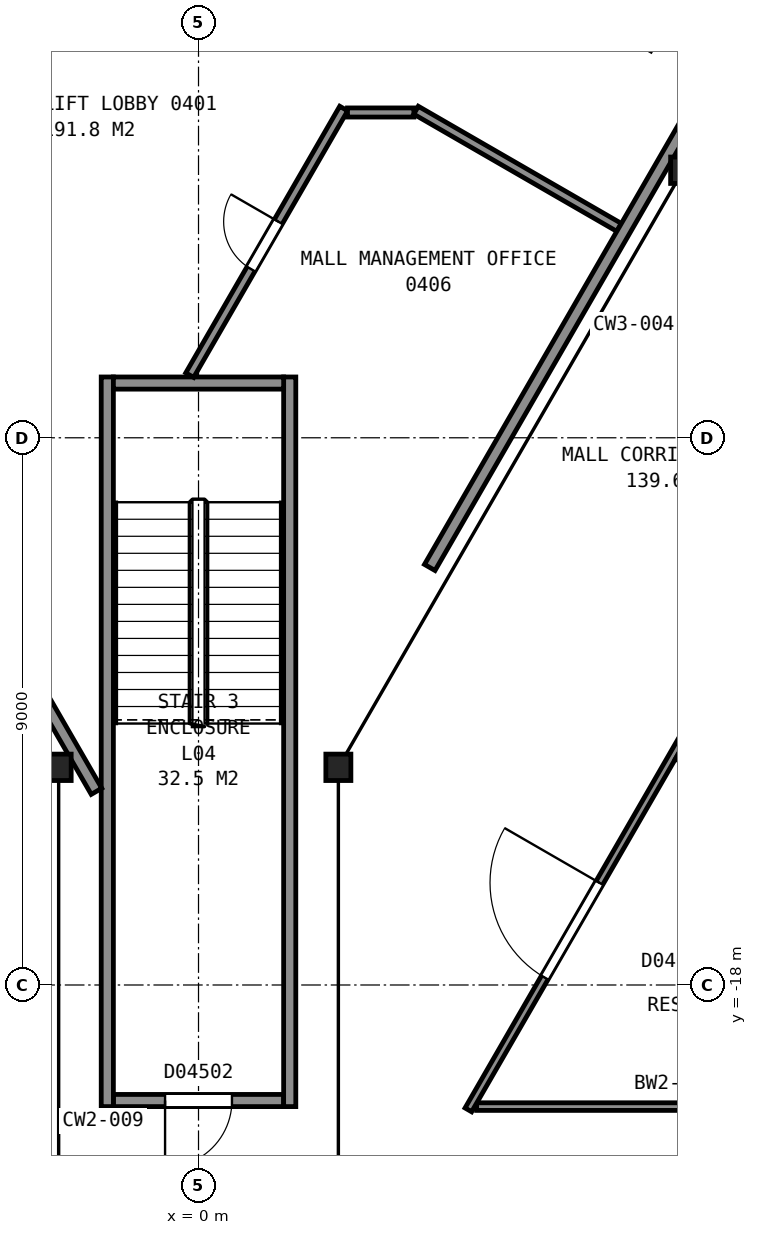
"""IFC4 building model, lengths in metres.
Left out: names, types, materials, properties, quantities, classifications, styles, units other than length and angle.
Written with IfcOpenShell. Run it as: python <this file> out.ifc"""

import sys

from ifc_helpers import new_model, si_unit, direction, frame, frame_2d, origin, origin_2d, place, context, subcontext, project, spatial, rectangle, i_section, extrude, element, fill, save


model = new_model("IFC4")
c1 = context("Model", 3, precision=1e-05, world=origin(), true_north=direction((0.0, 1.0)))
c2 = subcontext(c1, "Body", "Model", "MODEL_VIEW")
j1 = project(units=[si_unit("LENGTHUNIT", "METRE"), si_unit("PLANEANGLEUNIT", "RADIAN")], contexts=[c1])
p1 = place(None, origin())
s1 = spatial("IfcSite", under=j1, at=p1, CompositionType="ELEMENT")
p2 = place(p1, origin())
s2 = spatial("IfcBuilding", under=s1, at=p2, CompositionType="ELEMENT")
p3 = place(p2, frame((0.0, 0.0, 27.2)))
s3 = spatial("IfcBuildingStorey", under=s2, at=p3, CompositionType="ELEMENT", Elevation=27.2)
for number, where, z_axis, x_axis in (
    (1, (-2.3, -14.42, 0.0), (0.0, 0.0, 1.0), (1.0, 0.0, 0.0)),
    (2, (2.3, -14.42, 0.0), (0.0, 0.0, 1.0), (1.0, 0.0, 0.0)),
    (3, (7.97, -4.6, 0.0), (0.0, 0.0, 1.0), (1.0, 0.0, 0.0)),
):
    element("IfcColumn", number, at=place(p3, frame(where, z_axis=z_axis, x_axis=x_axis)), inside=s3, PredefinedType="COLUMN", context=c2, shape_type="SweptSolid", body=[
        extrude(i_section(OverallWidth=0.411, OverallDepth=0.434, WebThickness=0.036, FlangeThickness=0.057, FilletRadius=0.015, at=origin_2d()), origin(), (0.0, 0.0, 1.0), 4.8),
    ])
p4 = place(p3, frame((-1.4, -19.9, 0.0), z_axis=(0.0, 0.0, 1.0), x_axis=(1.0, 0.0, 0.0)))
e4 = element("IfcWall", 4, at=p4, inside=s3, PredefinedType="PARTITIONING", context=c2, shape_type="SweptSolid", body=[
    extrude(rectangle(XDim=2.8, YDim=0.2, at=frame_2d((1.4, 0.0))), origin(), (0.0, 0.0, 1.0), 4.55),
])
p5 = place(p4, frame((0.85, 0.0, 0.0)))
e5 = element("IfcOpeningElement", 5, at=p5, cuts=e4, PredefinedType="OPENING", context=c2, shape_type="SweptSolid", body=[
    extrude(rectangle(XDim=1.1, YDim=2.1, at=frame_2d((0.55, 1.05))), frame((0.0, 0.11, 0.0), z_axis=(0.0, -1.0, 0.0), x_axis=(1.0, 0.0, 0.0)), (0.0, 0.0, 1.0), 0.22),
])
for number, where, z_axis, x_axis in (
    (6, (1.5, -8.0, 0.0), (0.0, 0.0, 1.0), (0.0, -1.0, 0.0)),
    (7, (-1.5, -8.0, 0.0), (0.0, 0.0, 1.0), (0.0, -1.0, 0.0)),
):
    element("IfcWall", number, at=place(p3, frame(where, z_axis=z_axis, x_axis=x_axis)), inside=s3, PredefinedType="PARTITIONING", context=c2, shape_type="SweptSolid", body=[
        extrude(rectangle(XDim=12.0, YDim=0.2, at=frame_2d((6.0, 0.0))), origin(), (0.0, 0.0, 1.0), 4.55),
    ])
p6 = place(p3, frame((-1.4, -8.1, 0.0), z_axis=(0.0, 0.0, 1.0), x_axis=(1.0, 0.0, 0.0)))
e8 = element("IfcWall", 8, at=p6, inside=s3, PredefinedType="PARTITIONING", context=c2, shape_type="SweptSolid", body=[
    extrude(rectangle(XDim=2.8, YDim=0.2, at=frame_2d((1.4, 0.0))), origin(), (0.0, 0.0, 1.0), 4.55),
])
p7 = place(p3, frame((-4.914, -9.208, 0.0), z_axis=(0.0, 0.0, 1.0), x_axis=(0.499947703927, -0.866055594831, 0.0)))
e9 = element("IfcWall", 9, at=p7, inside=s3, PredefinedType="PARTITIONING", context=c2, shape_type="SweptSolid", body=[
    extrude(rectangle(XDim=6.474, YDim=0.2, at=frame_2d((3.237, 0.0))), origin(), (0.0, 0.0, 1.0), 4.55),
])
p8 = place(p3, frame((2.387, -3.585, 0.0), z_axis=(0.0, 0.0, 1.0), x_axis=(-0.500064700545, -0.865988045685, 0.0)))
e10 = element("IfcWall", 10, at=p8, inside=s3, PredefinedType="PARTITIONING", context=c2, shape_type="SweptSolid", body=[
    extrude(rectangle(XDim=5.063, YDim=0.15, at=frame_2d((2.532, 0.0))), origin(), (0.0, 0.0, 1.0), 4.55),
])
p9 = place(p8, frame((2.148, 0.0, 0.0)))
e11 = element("IfcOpeningElement", 11, at=p9, cuts=e10, PredefinedType="OPENING", context=c2, shape_type="SweptSolid", body=[
    extrude(rectangle(XDim=0.9, YDim=2.1, at=frame_2d((0.45, 1.05))), frame((0.0, 0.085, 0.0), z_axis=(0.0, -1.0, 0.0), x_axis=(1.0, 0.0, 0.0)), (0.0, 0.0, 1.0), 0.17),
])
p10 = place(p3, frame((2.45, -3.65, 0.0), z_axis=(0.0, 0.0, 1.0), x_axis=(1.0, 0.0, 0.0)))
e12 = element("IfcWall", 12, at=p10, inside=s3, PredefinedType="PARTITIONING", context=c2, shape_type="SweptSolid", body=[
    extrude(rectangle(XDim=1.092, YDim=0.15, at=frame_2d((0.546, 0.0))), origin(), (0.0, 0.0, 1.0), 4.55),
])
p11 = place(p3, frame((3.577, -3.613, 0.0), z_axis=(0.0, 0.0, 1.0), x_axis=(0.866080151888, -0.499905161512, 0.0)))
e13 = element("IfcWall", 13, at=p11, inside=s3, PredefinedType="PARTITIONING", context=c2, shape_type="SweptSolid", body=[
    extrude(rectangle(XDim=3.856, YDim=0.15, at=frame_2d((1.928, 0.0))), origin(), (0.0, 0.0, 1.0), 4.55),
])
p12 = place(p3, frame((3.803, -11.133, 0.0), z_axis=(0.0, 0.0, 1.0), x_axis=(0.499995287022, 0.866028124807, 0.0)))
e14 = element("IfcWall", 14, at=p12, inside=s3, PredefinedType="PARTITIONING", context=c2, shape_type="SweptSolid", body=[
    extrude(rectangle(XDim=19.726, YDim=0.2, at=frame_2d((9.863, 0.0))), origin(), (0.0, 0.0, 1.0), 4.55),
])
p13 = place(p12, frame((9.2, 0.0, 0.0)))
e15 = element("IfcOpeningElement", 15, at=p13, cuts=e14, PredefinedType="OPENING", context=c2, shape_type="SweptSolid", body=[
    extrude(rectangle(XDim=1.8, YDim=2.1, at=frame_2d((0.9, 1.05))), frame((0.0, 0.11, 0.0), z_axis=(0.0, -1.0, 0.0), x_axis=(1.0, 0.0, 0.0)), (0.0, 0.0, 1.0), 0.22),
])
p14 = place(p3, frame((4.574, -20.0, 0.0), z_axis=(0.0, 0.0, 1.0), x_axis=(1.0, 0.0, 0.0)))
e16 = element("IfcWall", 16, at=p14, inside=s3, PredefinedType="PARTITIONING", context=c2, shape_type="SweptSolid", body=[
    extrude(rectangle(XDim=7.285, YDim=0.125, at=frame_2d((3.643, 0.0))), origin(), (0.0, 0.0, 1.0), 4.64),
])
p15 = place(p3, frame((19.586, 6.184, 0.0), z_axis=(0.0, 0.0, 1.0), x_axis=(-0.499994028088, -0.866028851642, 0.0)))
e17 = element("IfcWall", 17, at=p15, inside=s3, PredefinedType="PARTITIONING", context=c2, shape_type="SweptSolid", body=[
    extrude(rectangle(XDim=30.297, YDim=0.125, at=frame_2d((15.148, 0.0))), origin(), (0.0, 0.0, 1.0), 3.653),
])
p16 = place(p15, frame((25.985, 0.0, 0.0)))
e18 = element("IfcOpeningElement", 18, at=p16, cuts=e17, PredefinedType="OPENING", context=c2, shape_type="SweptSolid", body=[
    extrude(rectangle(XDim=1.8, YDim=2.4, at=frame_2d((0.9, 1.2))), frame((0.0, 0.073, 0.0), z_axis=(0.0, -1.0, 0.0), x_axis=(1.0, 0.0, 0.0)), (0.0, 0.0, 1.0), 0.145),
])
p17 = place(p15, frame((18.832, 0.0, 0.0)))
e19 = element("IfcOpeningElement", 19, at=p17, cuts=e17, PredefinedType="OPENING", context=c2, shape_type="SweptSolid", body=[
    extrude(rectangle(XDim=1.0, YDim=2.1, at=frame_2d((0.5, 1.05))), frame((0.0, 0.073, 0.0), z_axis=(0.0, -1.0, 0.0), x_axis=(1.0, 0.0, 0.0)), (0.0, 0.0, 1.0), 0.145),
])
p18 = place(p15, frame((10.049, 0.0, 0.0)))
e20 = element("IfcOpeningElement", 20, at=p18, cuts=e17, PredefinedType="OPENING", context=c2, shape_type="SweptSolid", body=[
    extrude(rectangle(XDim=1.8, YDim=2.4, at=frame_2d((0.9, 1.2))), frame((0.0, 0.073, 0.0), z_axis=(0.0, -1.0, 0.0), x_axis=(1.0, 0.0, 0.0)), (0.0, 0.0, 1.0), 0.145),
])
p19 = place(p15, frame((2.917, 0.0, 0.0)))
e21 = element("IfcOpeningElement", 21, at=p19, cuts=e17, PredefinedType="OPENING", context=c2, shape_type="SweptSolid", body=[
    extrude(rectangle(XDim=1.0, YDim=2.1, at=frame_2d((0.5, 1.05))), frame((0.0, 0.073, 0.0), z_axis=(0.0, -1.0, 0.0), x_axis=(1.0, 0.0, 0.0)), (0.0, 0.0, 1.0), 0.145),
])
p20 = place(p3, frame((7.875, -14.226, 0.0), z_axis=(0.0, 0.0, 1.0), x_axis=(0.866003371142, -0.500038159714, 0.0)))
e22 = element("IfcWall", 22, at=p20, inside=s3, PredefinedType="PARTITIONING", context=c2, shape_type="SweptSolid", body=[
    extrude(rectangle(XDim=6.337, YDim=0.125, at=frame_2d((3.168, 0.0))), origin(), (0.0, 0.0, 1.0), 3.653),
])
p21 = place(p5, origin())
e23 = element("IfcDoor", 23, at=p21, inside=s3, OperationType="SINGLE_SWING_LEFT", PredefinedType="DOOR", context=c2, shape_type="SweptSolid", body=[
    extrude(rectangle(XDim=1.1, YDim=2.1, at=frame_2d((0.55, 1.05))), frame((0.0, 0.025, 0.0), z_axis=(0.0, -1.0, 0.0), x_axis=(1.0, 0.0, 0.0)), (0.0, 0.0, 1.0), 0.05),
])
fill(e5, e23)
p22 = place(p9, origin())
e24 = element("IfcDoor", 24, at=p22, inside=s3, OperationType="SINGLE_SWING_LEFT", PredefinedType="DOOR", context=c2, shape_type="SweptSolid", body=[
    extrude(rectangle(XDim=0.9, YDim=2.1, at=frame_2d((0.45, 1.05))), frame((0.0, 0.025, 0.0), z_axis=(0.0, -1.0, 0.0), x_axis=(1.0, 0.0, 0.0)), (0.0, 0.0, 1.0), 0.05),
])
fill(e11, e24)
p23 = place(p16, origin())
e25 = element("IfcDoor", 25, at=p23, inside=s3, OperationType="DOUBLE_DOOR_SINGLE_SWING", PredefinedType="DOOR", context=c2, shape_type="SweptSolid", body=[
    extrude(rectangle(XDim=1.8, YDim=2.4, at=frame_2d((0.9, 1.2))), frame((0.0, 0.025, 0.0), z_axis=(0.0, -1.0, 0.0), x_axis=(1.0, 0.0, 0.0)), (0.0, 0.0, 1.0), 0.05),
])
fill(e18, e25)
save(model, sys.argv[1])
